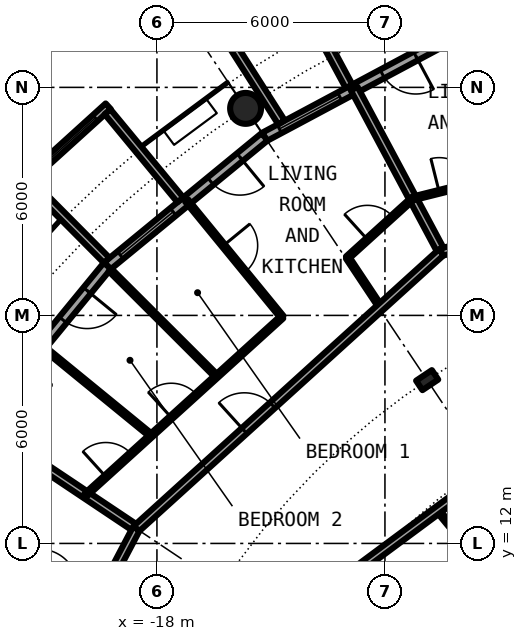
"""IFC4 building model, lengths in metres.
Left out: names, types, materials, properties, quantities, classifications, styles, units other than length and angle.
Written with IfcOpenShell. Run it as: python <this file> out.ifc"""

import sys

from ifc_helpers import new_model, si_unit, direction, frame, frame_2d, origin, origin_2d, place, context, subcontext, project, spatial, rectangle, circle, hollow_circle, i_section, extrude, element, fill, save


model = new_model("IFC4")
c1 = context("Model", 3, precision=1e-05, world=origin(), true_north=direction((0.0, 1.0)))
c2 = subcontext(c1, "Body", "Model", "MODEL_VIEW")
j1 = project(units=[si_unit("LENGTHUNIT", "METRE"), si_unit("PLANEANGLEUNIT", "RADIAN")], contexts=[c1])
p1 = place(None, origin())
s1 = spatial("IfcSite", under=j1, at=p1, CompositionType="ELEMENT")
p2 = place(p1, origin())
s2 = spatial("IfcBuilding", under=s1, at=p2, CompositionType="ELEMENT")
p3 = place(p2, frame((0.0, 0.0, 154.35)))
s3 = spatial("IfcBuildingStorey", under=s2, at=p3, CompositionType="ELEMENT", Elevation=154.35)
p4 = place(p3, frame((-15.667, 23.448, 0.0), z_axis=(0.0, 0.0, 1.0), x_axis=(1.0, 0.0, 0.0)))
e1 = element("IfcColumn", 1, at=p4, inside=s3, PredefinedType="COLUMN", context=c2, shape_type="SweptSolid", body=[
    extrude(hollow_circle(Radius=0.406, WallThickness=0.04, at=origin_2d()), origin(), (0.0, 0.0, 1.0), 3.05),
])
p5 = place(p3, frame((-10.889, 16.297, 0.0), z_axis=(0.0, 0.0, 1.0), x_axis=(-0.55557023302, 0.831469612303, 0.0)))
e2 = element("IfcColumn", 2, at=p5, inside=s3, PredefinedType="COLUMN", context=c2, shape_type="SweptSolid", body=[
    extrude(i_section(OverallWidth=0.3, OverallDepth=0.5, WebThickness=0.014, FlangeThickness=0.028, FilletRadius=0.027, at=origin_2d()), origin(), (0.0, 0.0, 1.0), 3.05),
])
p6 = place(p3, frame((-10.447, 25.222, 0.0), z_axis=(0.0, 0.0, 1.0), x_axis=(-0.881915646801, -0.471407246368, 0.0)))
e3 = element("IfcWall", 3, at=p6, inside=s3, PredefinedType="SOLIDWALL", context=c2, shape_type="SweptSolid", body=[
    extrude(rectangle(XDim=5.352, YDim=0.25, at=frame_2d((2.676, 0.0))), origin(), (0.0, 0.0, 1.0), 2.7),
])
p7 = place(p6, frame((0.841, 0.0, 0.0)))
e4 = element("IfcOpeningElement", 4, at=p7, cuts=e3, PredefinedType="OPENING", context=c2, shape_type="SweptSolid", body=[
    extrude(rectangle(XDim=1.0, YDim=2.2, at=frame_2d((0.5, 1.1))), frame((0.0, 0.135, 0.0), z_axis=(0.0, -1.0, 0.0), x_axis=(1.0, 0.0, 0.0)), (0.0, 0.0, 1.0), 0.27),
])
p8 = place(p6, frame((3.111, 0.0, 0.3)))
e5 = element("IfcOpeningElement", 5, at=p8, cuts=e3, PredefinedType="OPENING", context=c2, shape_type="SweptSolid", body=[
    extrude(rectangle(XDim=1.8, YDim=2.1, at=frame_2d((0.9, 1.05))), frame((0.0, 0.135, 0.0), z_axis=(0.0, -1.0, 0.0), x_axis=(1.0, 0.0, 0.0)), (0.0, 0.0, 1.0), 0.27),
])
p9 = place(p3, frame((-12.945, 24.029, -0.03), z_axis=(0.0, 0.0, 1.0), x_axis=(-0.474424310775, 0.88029629861, 0.0)))
e6 = element("IfcWall", 6, at=p9, inside=s3, PredefinedType="SOLIDWALL", context=c2, shape_type="SweptSolid", body=[
    extrude(rectangle(XDim=3.006, YDim=0.2, at=frame_2d((1.503, 0.0))), origin(), (0.0, 0.0, 1.0), 2.73),
])
p10 = place(p3, frame((-14.722, 23.079, -0.03), z_axis=(0.0, 0.0, 1.0), x_axis=(-0.537572179146, 0.843217737129, 0.0)))
e7 = element("IfcWall", 7, at=p10, inside=s3, PredefinedType="SOLIDWALL", context=c2, shape_type="SweptSolid", body=[
    extrude(rectangle(XDim=2.924, YDim=0.2, at=frame_2d((1.462, 0.0))), origin(), (0.0, 0.0, 1.0), 2.73),
])
p11 = place(p3, frame((-15.167, 22.699, 0.0), z_axis=(0.0, 0.0, 1.0), x_axis=(-0.773019449054, -0.634382322723, 0.0)))
e8 = element("IfcWall", 8, at=p11, inside=s3, PredefinedType="SOLIDWALL", context=c2, shape_type="SweptSolid", body=[
    extrude(rectangle(XDim=5.352, YDim=0.25, at=frame_2d((2.676, 0.0))), origin(), (0.0, 0.0, 1.0), 2.7),
])
p12 = place(p11, frame((0.841, 0.0, 0.0)))
e9 = element("IfcOpeningElement", 9, at=p12, cuts=e8, PredefinedType="OPENING", context=c2, shape_type="SweptSolid", body=[
    extrude(rectangle(XDim=1.0, YDim=2.2, at=frame_2d((0.5, 1.1))), frame((0.0, 0.135, 0.0), z_axis=(0.0, -1.0, 0.0), x_axis=(1.0, 0.0, 0.0)), (0.0, 0.0, 1.0), 0.27),
])
p13 = place(p11, frame((3.111, 0.0, 0.3)))
e10 = element("IfcOpeningElement", 10, at=p13, cuts=e8, PredefinedType="OPENING", context=c2, shape_type="SweptSolid", body=[
    extrude(rectangle(XDim=1.8, YDim=2.1, at=frame_2d((0.9, 1.05))), frame((0.0, 0.135, 0.0), z_axis=(0.0, -1.0, 0.0), x_axis=(1.0, 0.0, 0.0)), (0.0, 0.0, 1.0), 0.27),
])
p14 = place(p3, frame((-19.282, 23.503, -0.03), z_axis=(0.0, 0.0, 1.0), x_axis=(-0.740998365753, -0.671506829416, 0.0)))
e11 = element("IfcWall", 11, at=p14, inside=s3, PredefinedType="SOLIDWALL", context=c2, shape_type="SweptSolid", body=[
    extrude(rectangle(XDim=2.993, YDim=0.2, at=frame_2d((1.497, 0.0))), origin(), (0.0, 0.0, 1.0), 2.73),
])
p15 = place(p14, frame((0.457, 0.0, 0.33)))
e12 = element("IfcOpeningElement", 12, at=p15, cuts=e11, PredefinedType="OPENING", context=c2, shape_type="SweptSolid", body=[
    extrude(circle(Radius=1.04, at=frame_2d((1.04, 1.04))), frame((0.0, 0.11, 0.0), z_axis=(0.0, -1.0, 0.0), x_axis=(1.0, 0.0, 0.0)), (0.0, 0.0, 1.0), 0.22),
])
p16 = place(p3, frame((-17.384, 21.041, -0.03), z_axis=(0.0, 0.0, 1.0), x_axis=(-0.63709551667, 0.770784861449, 0.0)))
e13 = element("IfcWall", 13, at=p16, inside=s3, PredefinedType="SOLIDWALL", context=c2, shape_type="SweptSolid", body=[
    extrude(rectangle(XDim=3.006, YDim=0.2, at=frame_2d((1.503, 0.0))), origin(), (0.0, 0.0, 1.0), 2.73),
])
p17 = place(p3, frame((-19.323, 19.45, -0.03), z_axis=(0.0, 0.0, 1.0), x_axis=(-0.704476739375, 0.709727076896, 0.0)))
e14 = element("IfcWall", 14, at=p17, inside=s3, PredefinedType="SOLIDWALL", context=c2, shape_type="SweptSolid", body=[
    extrude(rectangle(XDim=2.883, YDim=0.2, at=frame_2d((1.441, 0.0))), origin(), (0.0, 0.0, 1.0), 2.73),
])
p18 = place(p3, frame((-19.304, 19.304, 0.0), z_axis=(0.0, 0.0, 1.0), x_axis=(-0.634382322723, -0.773019449054, 0.0)))
e15 = element("IfcWall", 15, at=p18, inside=s3, PredefinedType="SOLIDWALL", context=c2, shape_type="SweptSolid", body=[
    extrude(rectangle(XDim=5.352, YDim=0.25, at=frame_2d((2.676, 0.0))), origin(), (0.0, 0.0, 1.0), 2.7),
])
p19 = place(p18, frame((0.841, 0.0, 0.0)))
e16 = element("IfcOpeningElement", 16, at=p19, cuts=e15, PredefinedType="OPENING", context=c2, shape_type="SweptSolid", body=[
    extrude(rectangle(XDim=1.0, YDim=2.2, at=frame_2d((0.5, 1.1))), frame((0.0, 0.135, 0.0), z_axis=(0.0, -1.0, 0.0), x_axis=(1.0, 0.0, 0.0)), (0.0, 0.0, 1.0), 0.27),
])
p20 = place(p18, frame((3.111, 0.0, 0.3)))
e17 = element("IfcOpeningElement", 17, at=p20, cuts=e15, PredefinedType="OPENING", context=c2, shape_type="SweptSolid", body=[
    extrude(rectangle(XDim=1.8, YDim=2.1, at=frame_2d((0.9, 1.05))), frame((0.0, 0.135, 0.0), z_axis=(0.0, -1.0, 0.0), x_axis=(1.0, 0.0, 0.0)), (0.0, 0.0, 1.0), 0.27),
])
p21 = place(p3, frame((-12.984, 19.521, 0.0), z_axis=(0.0, 0.0, 1.0), x_axis=(0.55373148684, -0.832695286694, 0.0)))
e18 = element("IfcWall", 18, at=p21, inside=s3, PredefinedType="PARTITIONING", context=c2, shape_type="SweptSolid", body=[
    extrude(rectangle(XDim=1.571, YDim=0.1, at=frame_2d((0.786, 0.0))), origin(), (0.0, 0.0, 1.0), 2.7),
])
p22 = place(p3, frame((-22.595, 15.098, 0.0), z_axis=(0.0, 0.0, 1.0), x_axis=(0.831387096605, -0.55569370664, 0.0)))
e19 = element("IfcWall", 19, at=p22, inside=s3, PredefinedType="PARTITIONING", context=c2, shape_type="SweptSolid", body=[
    extrude(rectangle(XDim=4.875, YDim=0.2, at=frame_2d((2.438, 0.0))), origin(), (0.0, 0.0, 1.0), 2.7),
])
p23 = place(p3, frame((-21.04, 17.199, 0.0), z_axis=(0.0, 0.0, 1.0), x_axis=(0.774321581607, -0.63279229472, 0.0)))
e20 = element("IfcWall", 20, at=p23, inside=s3, PredefinedType="PARTITIONING", context=c2, shape_type="SweptSolid", body=[
    extrude(rectangle(XDim=3.731, YDim=0.1, at=frame_2d((1.866, 0.0))), origin(), (0.0, 0.0, 1.0), 2.7),
])
p24 = place(p3, frame((-19.234, 19.197, 0.0), z_axis=(0.0, 0.0, 1.0), x_axis=(0.707722727509, -0.706490297858, 0.0)))
e21 = element("IfcWall", 21, at=p24, inside=s3, PredefinedType="PARTITIONING", context=c2, shape_type="SweptSolid", body=[
    extrude(rectangle(XDim=3.962, YDim=0.1, at=frame_2d((1.981, 0.0))), origin(), (0.0, 0.0, 1.0), 2.7),
])
p25 = place(p3, frame((-17.219, 21.023, 0.0), z_axis=(0.0, 0.0, 1.0), x_axis=(0.633590098448, -0.773668913133, 0.0)))
e22 = element("IfcWall", 22, at=p25, inside=s3, PredefinedType="PARTITIONING", context=c2, shape_type="SweptSolid", body=[
    extrude(rectangle(XDim=3.962, YDim=0.1, at=frame_2d((1.981, 0.0))), origin(), (0.0, 0.0, 1.0), 2.7),
])
p26 = place(p25, frame((1.531, 0.0, 0.0)))
e23 = element("IfcOpeningElement", 23, at=p26, cuts=e22, PredefinedType="OPENING", context=c2, shape_type="SweptSolid", body=[
    extrude(rectangle(XDim=0.9, YDim=2.3, at=frame_2d((0.45, 1.15))), frame((0.0, 0.06, 0.0), z_axis=(0.0, -1.0, 0.0), x_axis=(1.0, 0.0, 0.0)), (0.0, 0.0, 1.0), 0.12),
])
p27 = place(p3, frame((-12.809, 23.966, 0.0), z_axis=(0.0, 0.0, 1.0), x_axis=(0.471271812246, -0.881988026553, 0.0)))
e24 = element("IfcWall", 24, at=p27, inside=s3, PredefinedType="PARTITIONING", context=c2, shape_type="SweptSolid", body=[
    extrude(rectangle(XDim=4.874, YDim=0.2, at=frame_2d((2.437, 0.0))), origin(), (0.0, 0.0, 1.0), 2.7),
])
p28 = place(p3, frame((-10.616, 12.875, 0.0), z_axis=(0.0, 0.0, 1.0), x_axis=(0.636045954217, -0.771651180342, 0.0)))
e25 = element("IfcWall", 25, at=p28, inside=s3, PredefinedType="PARTITIONING", context=c2, shape_type="SweptSolid", body=[
    extrude(rectangle(XDim=8.968, YDim=0.1, at=frame_2d((4.484, 0.0))), origin(), (0.0, 0.0, 1.0), 2.7),
])
p29 = place(p28, frame((1.667, 0.0, 0.0)))
e26 = element("IfcOpeningElement", 26, at=p29, cuts=e25, PredefinedType="OPENING", context=c2, shape_type="SweptSolid", body=[
    extrude(rectangle(XDim=0.9, YDim=2.3, at=frame_2d((0.45, 1.15))), frame((0.0, 0.06, 0.0), z_axis=(0.0, -1.0, 0.0), x_axis=(1.0, 0.0, 0.0)), (0.0, 0.0, 1.0), 0.12),
])
p30 = place(p28, frame((6.151, 0.0, 0.0)))
e27 = element("IfcOpeningElement", 27, at=p30, cuts=e25, PredefinedType="OPENING", context=c2, shape_type="SweptSolid", body=[
    extrude(rectangle(XDim=0.9, YDim=2.3, at=frame_2d((0.45, 1.15))), frame((0.0, 0.06, 0.0), z_axis=(0.0, -1.0, 0.0), x_axis=(1.0, 0.0, 0.0)), (0.0, 0.0, 1.0), 0.12),
])
p31 = place(p3, frame((-13.349, 10.848, 0.0), z_axis=(0.0, 0.0, 1.0), x_axis=(0.803229232922, 0.595670042371, 0.0)))
e28 = element("IfcWall", 28, at=p31, inside=s3, PredefinedType="PARTITIONING", context=c2, shape_type="SweptSolid", body=[
    extrude(rectangle(XDim=10.224, YDim=0.2, at=frame_2d((5.112, 0.0))), origin(), (0.0, 0.0, 1.0), 2.7),
])
p32 = place(p31, frame((4.612, 0.0, 0.0)))
e29 = element("IfcOpeningElement", 29, at=p32, cuts=e28, PredefinedType="OPENING", context=c2, shape_type="SweptSolid", body=[
    extrude(rectangle(XDim=1.0, YDim=2.3, at=frame_2d((0.5, 1.15))), frame((0.0, 0.11, 0.0), z_axis=(0.0, -1.0, 0.0), x_axis=(1.0, 0.0, 0.0)), (0.0, 0.0, 1.0), 0.22),
])
p33 = place(p3, frame((-18.544, 12.385, 0.0), z_axis=(0.0, 0.0, 1.0), x_axis=(0.740849323054, 0.67167125927, 0.0)))
e30 = element("IfcWall", 30, at=p33, inside=s3, PredefinedType="PARTITIONING", context=c2, shape_type="SweptSolid", body=[
    extrude(rectangle(XDim=10.842, YDim=0.2, at=frame_2d((5.421, 0.0))), origin(), (0.0, 0.0, 1.0), 2.7),
])
p34 = place(p33, frame((3.839, 0.0, 0.0)))
e31 = element("IfcOpeningElement", 31, at=p34, cuts=e30, PredefinedType="OPENING", context=c2, shape_type="SweptSolid", body=[
    extrude(rectangle(XDim=1.0, YDim=2.3, at=frame_2d((0.5, 1.15))), frame((0.0, 0.11, 0.0), z_axis=(0.0, -1.0, 0.0), x_axis=(1.0, 0.0, 0.0)), (0.0, 0.0, 1.0), 0.22),
])
p35 = place(p3, frame((-10.512, 19.667, 0.0), z_axis=(0.0, 0.0, 1.0), x_axis=(0.970086843848, 0.242758141765, 0.0)))
e32 = element("IfcWall", 32, at=p35, inside=s3, PredefinedType="PARTITIONING", context=c2, shape_type="SweptSolid", body=[
    extrude(rectangle(XDim=10.842, YDim=0.2, at=frame_2d((5.421, 0.0))), origin(), (0.0, 0.0, 1.0), 2.7),
])
p36 = place(p35, frame((6.002, 0.0, 0.0)))
e33 = element("IfcOpeningElement", 33, at=p36, cuts=e32, PredefinedType="OPENING", context=c2, shape_type="SweptSolid", body=[
    extrude(rectangle(XDim=1.0, YDim=2.3, at=frame_2d((0.5, 1.15))), frame((0.0, 0.11, 0.0), z_axis=(0.0, -1.0, 0.0), x_axis=(1.0, 0.0, 0.0)), (0.0, 0.0, 1.0), 0.22),
])
p37 = place(p3, frame((-19.307, 10.935, 0.0), z_axis=(0.0, 0.0, 1.0), x_axis=(0.465605550524, 0.884992356646, 0.0)))
e34 = element("IfcWall", 34, at=p37, inside=s3, PredefinedType="PARTITIONING", context=c2, shape_type="SweptSolid", body=[
    extrude(rectangle(XDim=1.643, YDim=0.2, at=frame_2d((0.821, 0.0))), origin(), (0.0, 0.0, 1.0), 2.7),
])
p38 = place(p3, frame((-19.872, 13.278, 0.0), z_axis=(0.0, 0.0, 1.0), x_axis=(0.740923753351, 0.671589153962, 0.0)))
e35 = element("IfcWall", 35, at=p38, inside=s3, PredefinedType="PARTITIONING", context=c2, shape_type="SweptSolid", body=[
    extrude(rectangle(XDim=6.969, YDim=0.1, at=frame_2d((3.484, 0.0))), origin(), (0.0, 0.0, 1.0), 2.7),
])
p39 = place(p38, frame((3.034, 0.0, 0.0)))
e36 = element("IfcOpeningElement", 36, at=p39, cuts=e35, PredefinedType="OPENING", context=c2, shape_type="SweptSolid", body=[
    extrude(rectangle(XDim=0.9, YDim=2.3, at=frame_2d((0.45, 1.15))), frame((0.0, 0.06, 0.0), z_axis=(0.0, -1.0, 0.0), x_axis=(1.0, 0.0, 0.0)), (0.0, 0.0, 1.0), 0.12),
])
p40 = place(p38, frame((0.711, 0.0, 0.0)))
e37 = element("IfcOpeningElement", 37, at=p40, cuts=e35, PredefinedType="OPENING", context=c2, shape_type="SweptSolid", body=[
    extrude(rectangle(XDim=0.9, YDim=2.3, at=frame_2d((0.45, 1.15))), frame((0.0, 0.06, 0.0), z_axis=(0.0, -1.0, 0.0), x_axis=(1.0, 0.0, 0.0)), (0.0, 0.0, 1.0), 0.12),
])
p41 = place(p3, frame((-12.993, 19.513, 0.0), z_axis=(0.0, 0.0, 1.0), x_axis=(0.74087097024, 0.671647381783, 0.0)))
e38 = element("IfcWall", 38, at=p41, inside=s3, PredefinedType="PARTITIONING", context=c2, shape_type="SweptSolid", body=[
    extrude(rectangle(XDim=2.324, YDim=0.1, at=frame_2d((1.162, 0.0))), origin(), (0.0, 0.0, 1.0), 2.7),
])
p42 = place(p41, frame((0.719, 0.0, 0.0)))
e39 = element("IfcOpeningElement", 39, at=p42, cuts=e38, PredefinedType="OPENING", context=c2, shape_type="SweptSolid", body=[
    extrude(rectangle(XDim=0.9, YDim=2.3, at=frame_2d((0.45, 1.15))), frame((0.0, 0.06, 0.0), z_axis=(0.0, -1.0, 0.0), x_axis=(1.0, 0.0, 0.0)), (0.0, 0.0, 1.0), 0.12),
])
p43 = place(p3, frame((-11.266, 21.078, 0.0), z_axis=(0.0, 0.0, 1.0), x_axis=(0.970074595874, 0.242807080706, 0.0)))
e40 = element("IfcWall", 40, at=p43, inside=s3, PredefinedType="PARTITIONING", context=c2, shape_type="SweptSolid", body=[
    extrude(rectangle(XDim=2.328, YDim=0.1, at=frame_2d((1.164, 0.0))), origin(), (0.0, 0.0, 1.0), 2.7),
])
p44 = place(p43, frame((0.714, 0.0, 0.0)))
e41 = element("IfcOpeningElement", 41, at=p44, cuts=e40, PredefinedType="OPENING", context=c2, shape_type="SweptSolid", body=[
    extrude(rectangle(XDim=0.9, YDim=2.3, at=frame_2d((0.45, 1.15))), frame((0.0, 0.06, 0.0), z_axis=(0.0, -1.0, 0.0), x_axis=(1.0, 0.0, 0.0)), (0.0, 0.0, 1.0), 0.12),
])
p45 = place(p7, origin())
e42 = element("IfcDoor", 42, at=p45, inside=s3, OperationType="SINGLE_SWING_LEFT", PredefinedType="DOOR", context=c2, shape_type="SweptSolid", body=[
    extrude(rectangle(XDim=1.0, YDim=2.2, at=frame_2d((0.5, 1.1))), frame((0.0, 0.025, 0.0), z_axis=(0.0, -1.0, 0.0), x_axis=(1.0, 0.0, 0.0)), (0.0, 0.0, 1.0), 0.05),
])
fill(e4, e42)
p46 = place(p8, origin())
e43 = element("IfcWindow", 43, at=p46, inside=s3, PartitioningType="SINGLE_PANEL", PredefinedType="WINDOW", context=c2, shape_type="SweptSolid", body=[
    extrude(rectangle(XDim=1.8, YDim=2.1, at=frame_2d((0.9, 1.05))), frame((0.0, 0.03, 0.0), z_axis=(0.0, -1.0, 0.0), x_axis=(1.0, 0.0, 0.0)), (0.0, 0.0, 1.0), 0.06),
])
fill(e5, e43)
p47 = place(p12, origin())
e44 = element("IfcDoor", 44, at=p47, inside=s3, OperationType="SINGLE_SWING_LEFT", PredefinedType="DOOR", context=c2, shape_type="SweptSolid", body=[
    extrude(rectangle(XDim=1.0, YDim=2.2, at=frame_2d((0.5, 1.1))), frame((0.0, 0.025, 0.0), z_axis=(0.0, -1.0, 0.0), x_axis=(1.0, 0.0, 0.0)), (0.0, 0.0, 1.0), 0.05),
])
fill(e9, e44)
p48 = place(p13, origin())
e45 = element("IfcWindow", 45, at=p48, inside=s3, PartitioningType="SINGLE_PANEL", PredefinedType="WINDOW", context=c2, shape_type="SweptSolid", body=[
    extrude(rectangle(XDim=1.8, YDim=2.1, at=frame_2d((0.9, 1.05))), frame((0.0, 0.03, 0.0), z_axis=(0.0, -1.0, 0.0), x_axis=(1.0, 0.0, 0.0)), (0.0, 0.0, 1.0), 0.06),
])
fill(e10, e45)
p49 = place(p15, origin())
e46 = element("IfcWindow", 46, at=p49, inside=s3, PartitioningType="SINGLE_PANEL", PredefinedType="WINDOW", context=c2, shape_type="SweptSolid", body=[
    extrude(circle(Radius=1.04, at=frame_2d((1.04, 1.04))), frame((0.0, 0.03, 0.0), z_axis=(0.0, -1.0, 0.0), x_axis=(1.0, 0.0, 0.0)), (0.0, 0.0, 1.0), 0.06),
])
fill(e12, e46)
p50 = place(p19, origin())
e47 = element("IfcDoor", 47, at=p50, inside=s3, OperationType="SINGLE_SWING_LEFT", PredefinedType="DOOR", context=c2, shape_type="SweptSolid", body=[
    extrude(rectangle(XDim=1.0, YDim=2.2, at=frame_2d((0.5, 1.1))), frame((0.0, 0.025, 0.0), z_axis=(0.0, -1.0, 0.0), x_axis=(1.0, 0.0, 0.0)), (0.0, 0.0, 1.0), 0.05),
])
fill(e16, e47)
p51 = place(p44, origin())
e48 = element("IfcDoor", 48, at=p51, inside=s3, OperationType="SINGLE_SWING_RIGHT", PredefinedType="DOOR", context=c2, shape_type="SweptSolid", body=[
    extrude(rectangle(XDim=0.9, YDim=2.3, at=frame_2d((0.45, 1.15))), frame((0.0, 0.025, 0.0), z_axis=(0.0, -1.0, 0.0), x_axis=(1.0, 0.0, 0.0)), (0.0, 0.0, 1.0), 0.05),
])
fill(e41, e48)
p52 = place(p34, origin())
e49 = element("IfcDoor", 49, at=p52, inside=s3, OperationType="SINGLE_SWING_LEFT", PredefinedType="DOOR", context=c2, shape_type="SweptSolid", body=[
    extrude(rectangle(XDim=1.0, YDim=2.3, at=frame_2d((0.5, 1.15))), frame((0.0, 0.025, 0.0), z_axis=(0.0, -1.0, 0.0), x_axis=(1.0, 0.0, 0.0)), (0.0, 0.0, 1.0), 0.05),
])
fill(e31, e49)
p53 = place(p42, origin())
e50 = element("IfcDoor", 50, at=p53, inside=s3, OperationType="SINGLE_SWING_RIGHT", PredefinedType="DOOR", context=c2, shape_type="SweptSolid", body=[
    extrude(rectangle(XDim=0.9, YDim=2.3, at=frame_2d((0.45, 1.15))), frame((0.0, 0.025, 0.0), z_axis=(0.0, -1.0, 0.0), x_axis=(1.0, 0.0, 0.0)), (0.0, 0.0, 1.0), 0.05),
])
fill(e39, e50)
p54 = place(p26, origin())
e51 = element("IfcDoor", 51, at=p54, inside=s3, OperationType="SINGLE_SWING_LEFT", PredefinedType="DOOR", context=c2, shape_type="SweptSolid", body=[
    extrude(rectangle(XDim=0.9, YDim=2.3, at=frame_2d((0.45, 1.15))), frame((0.0, 0.025, 0.0), z_axis=(0.0, -1.0, 0.0), x_axis=(1.0, 0.0, 0.0)), (0.0, 0.0, 1.0), 0.05),
])
fill(e23, e51)
p55 = place(p39, origin())
e52 = element("IfcDoor", 52, at=p55, inside=s3, OperationType="SINGLE_SWING_RIGHT", PredefinedType="DOOR", context=c2, shape_type="SweptSolid", body=[
    extrude(rectangle(XDim=0.9, YDim=2.3, at=frame_2d((0.45, 1.15))), frame((0.0, 0.025, 0.0), z_axis=(0.0, -1.0, 0.0), x_axis=(1.0, 0.0, 0.0)), (0.0, 0.0, 1.0), 0.05),
])
fill(e36, e52)
p56 = place(p40, origin())
e53 = element("IfcDoor", 53, at=p56, inside=s3, OperationType="SINGLE_SWING_LEFT", PredefinedType="DOOR", context=c2, shape_type="SweptSolid", body=[
    extrude(rectangle(XDim=0.9, YDim=2.3, at=frame_2d((0.45, 1.15))), frame((0.0, 0.025, 0.0), z_axis=(0.0, -1.0, 0.0), x_axis=(1.0, 0.0, 0.0)), (0.0, 0.0, 1.0), 0.05),
])
fill(e37, e53)
save(model, sys.argv[1])
